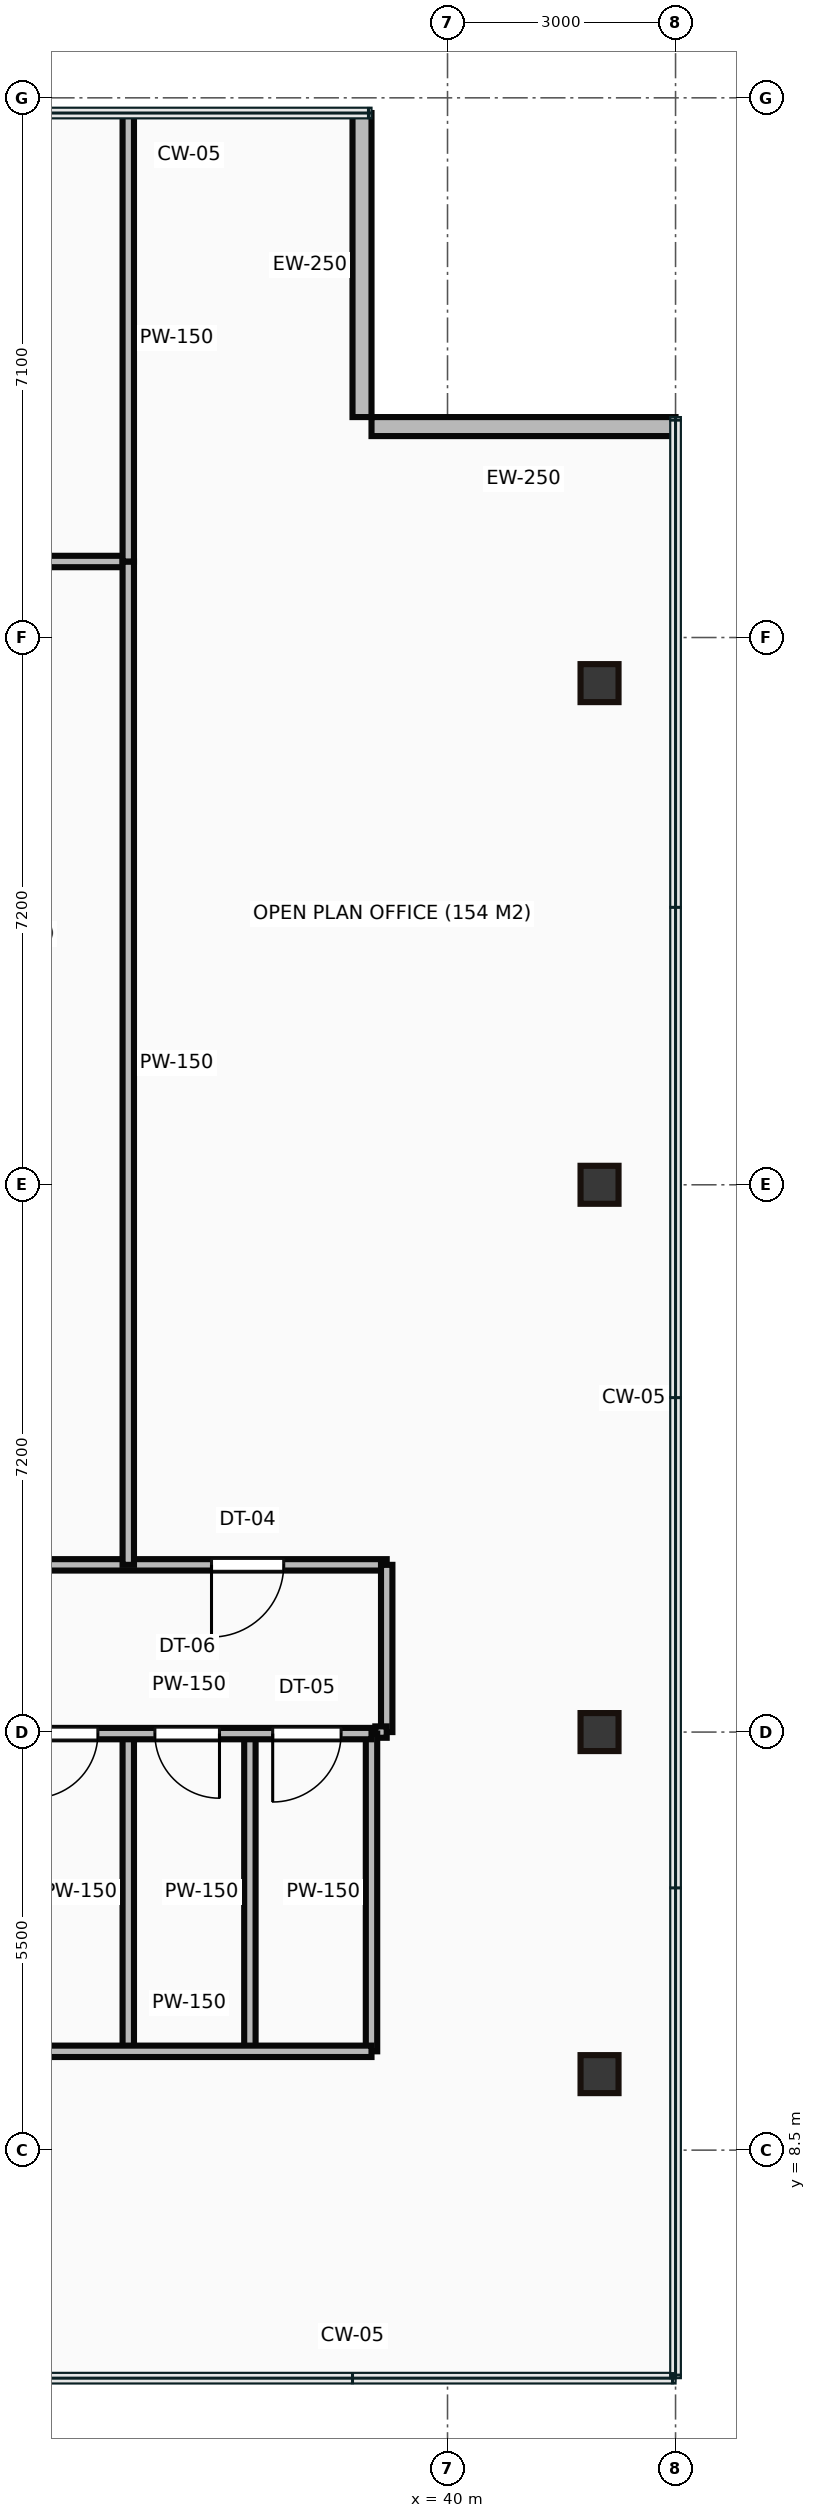
"""IFC4 building model, lengths in metres.
Left out: names, types, materials, properties, quantities, classifications, styles, units other than length and angle.
Written with IfcOpenShell. Run it as: python <this file> out.ifc"""

import sys

from ifc_helpers import new_model, si_unit, direction, frame, frame_2d, origin, origin_2d, place, context, subcontext, project, spatial, rectangle, hollow_rectangle, extrude, source, transform, mapped, element, fill, save


model = new_model("IFC4")
c1 = context("Model", 3, precision=1e-05, world=origin(), true_north=direction((0.0, 1.0)))
c2 = subcontext(c1, "Body", "Model", "MODEL_VIEW")
j1 = project(units=[si_unit("LENGTHUNIT", "METRE"), si_unit("PLANEANGLEUNIT", "RADIAN")], contexts=[c1])
p1 = place(None, origin())
s1 = spatial("IfcSite", under=j1, at=p1, CompositionType="ELEMENT")
p2 = place(p1, origin())
s2 = spatial("IfcBuilding", under=s1, at=p2, CompositionType="ELEMENT")
p3 = place(p2, frame((0.0, 0.0, 225.1)))
s3 = spatial("IfcBuildingStorey", under=s2, at=p3, CompositionType="ELEMENT", Elevation=225.1)
m1 = source(origin(), c2, "Body", "SweptSolid", [
    extrude(hollow_rectangle(XDim=0.5, YDim=0.5, WallThickness=0.022, at=origin_2d()), origin(), (0.0, 0.0, 1.0), 3.65),
])
for number, where, z_axis, x_axis in (
    (1, (42.0, 9.5, 0.0), (0.0, 0.0, 1.0), (1.0, 0.0, 0.0)),
    (2, (42.0, 14.0, 0.0), (0.0, 0.0, 1.0), (1.0, 0.0, 0.0)),
    (3, (42.0, 21.2, 0.0), (0.0, 0.0, 1.0), (1.0, 0.0, 0.0)),
    (4, (42.0, 27.8, 0.0), (0.0, 0.0, 1.0), (1.0, 0.0, 0.0)),
):
    element("IfcColumn", number, at=place(p3, frame(where, z_axis=z_axis, x_axis=x_axis)), inside=s3, PredefinedType="COLUMN", context=c2, shape_type="MappedRepresentation", body=[
        mapped(m1, transform((0.0, 0.0, 0.0))),
    ])
m2 = source(origin(), c2, "Body", "SweptSolid", [
    extrude(rectangle(XDim=4.0, YDim=0.25, at=frame_2d((2.0, 0.0))), origin(), (0.0, 0.0, 1.0), 3.4),
])
for number, where, z_axis, x_axis in (
    (5, (43.0, 31.175, 0.0), (0.0, 0.0, 1.0), (-1.0, 0.0, 0.0)),
    (6, (38.875, 31.3, 0.0), (0.0, 0.0, 1.0), (0.0, 1.0, 0.0)),
):
    element("IfcWall", number, at=place(p3, frame(where, z_axis=z_axis, x_axis=x_axis)), inside=s3, PredefinedType="STANDARD", context=c2, shape_type="MappedRepresentation", body=[
        mapped(m2, transform((0.0, 0.0, 0.0))),
    ])
m3 = source(origin(), c2, "Body", "SweptSolid", [
    extrude(rectangle(XDim=4.8, YDim=0.15, at=frame_2d((2.4, 0.0))), origin(), (0.0, 0.0, 1.0), 2.787),
])
p4 = place(p3, frame((34.2, 13.98, 0.0), z_axis=(0.0, 0.0, 1.0), x_axis=(1.0, 0.0, 0.0)))
e7 = element("IfcWall", 7, at=p4, inside=s3, PredefinedType="PARTITIONING", context=c2, shape_type="MappedRepresentation", body=[
    mapped(m3, transform((0.0, 0.0, 0.0))),
])
p5 = place(p4, frame((0.35, 0.0, 0.0)))
e8 = element("IfcOpeningElement", 8, at=p5, cuts=e7, PredefinedType="OPENING", context=c2, shape_type="SweptSolid", body=[
    extrude(rectangle(XDim=0.85, YDim=2.1, at=frame_2d((0.425, 1.05))), frame((0.0, 0.085, 0.0), z_axis=(0.0, -1.0, 0.0), x_axis=(1.0, 0.0, 0.0)), (0.0, 0.0, 1.0), 0.17),
])
p6 = place(p4, frame((1.95, 0.0, 0.0)))
e9 = element("IfcOpeningElement", 9, at=p6, cuts=e7, PredefinedType="OPENING", context=c2, shape_type="SweptSolid", body=[
    extrude(rectangle(XDim=0.85, YDim=2.1, at=frame_2d((0.425, 1.05))), frame((0.0, 0.085, 0.0), z_axis=(0.0, -1.0, 0.0), x_axis=(1.0, 0.0, 0.0)), (0.0, 0.0, 1.0), 0.17),
])
p7 = place(p4, frame((3.5, 0.0, 0.0)))
e10 = element("IfcOpeningElement", 10, at=p7, cuts=e7, PredefinedType="OPENING", context=c2, shape_type="SweptSolid", body=[
    extrude(rectangle(XDim=0.9, YDim=2.1, at=frame_2d((0.45, 1.05))), frame((0.0, 0.085, 0.0), z_axis=(0.0, -1.0, 0.0), x_axis=(1.0, 0.0, 0.0)), (0.0, 0.0, 1.0), 0.17),
])
m4 = source(origin(), c2, "Body", "SweptSolid", [
    extrude(rectangle(XDim=4.8, YDim=0.15, at=frame_2d((2.4, 0.0))), origin(), (0.0, 0.0, 1.0), 3.4),
])
p8 = place(p3, frame((34.2, 9.8, 0.0), z_axis=(0.0, 0.0, 1.0), x_axis=(1.0, 0.0, 0.0)))
e11 = element("IfcWall", 11, at=p8, inside=s3, PredefinedType="PARTITIONING", context=c2, shape_type="MappedRepresentation", body=[
    mapped(m4, transform((0.0, 0.0, 0.0))),
])
m5 = source(origin(), c2, "Body", "SweptSolid", [
    extrude(rectangle(XDim=4.18, YDim=0.15, at=frame_2d((2.09, 0.0))), origin(), (0.0, 0.0, 1.0), 3.4),
])
for number, where, z_axis, x_axis in (
    (12, (39.0, 9.8, 0.0), (0.0, 0.0, 1.0), (0.0, 1.0, 0.0)),
    (13, (35.8, 9.8, 0.0), (0.0, 0.0, 1.0), (0.0, 1.0, 0.0)),
    (14, (37.4, 9.8, 0.0), (0.0, 0.0, 1.0), (0.0, 1.0, 0.0)),
):
    element("IfcWall", number, at=place(p3, frame(where, z_axis=z_axis, x_axis=x_axis)), inside=s3, PredefinedType="PARTITIONING", context=c2, shape_type="MappedRepresentation", body=[
        mapped(m5, transform((0.0, 0.0, 0.0))),
    ])
m6 = source(origin(), c2, "Body", "SweptSolid", [
    extrude(rectangle(XDim=10.2, YDim=0.15, at=frame_2d((5.1, 0.0))), origin(), (0.0, 0.0, 1.0), 3.4),
])
p9 = place(p3, frame((29.0, 16.2, 0.0), z_axis=(0.0, 0.0, 1.0), x_axis=(1.0, 0.0, 0.0)))
e15 = element("IfcWall", 15, at=p9, inside=s3, PredefinedType="PARTITIONING", context=c2, shape_type="MappedRepresentation", body=[
    mapped(m6, transform((0.0, 0.0, 0.0))),
])
p10 = place(p9, frame((7.895, 0.0, 0.0)))
e16 = element("IfcOpeningElement", 16, at=p10, cuts=e15, PredefinedType="OPENING", context=c2, shape_type="SweptSolid", body=[
    extrude(rectangle(XDim=0.95, YDim=2.15, at=frame_2d((0.475, 1.075))), frame((0.0, 0.085, 0.0), z_axis=(0.0, -1.0, 0.0), x_axis=(1.0, 0.0, 0.0)), (0.0, 0.0, 1.0), 0.17),
])
m7 = source(origin(), c2, "Body", "SweptSolid", [
    extrude(rectangle(XDim=2.2, YDim=0.15, at=frame_2d((1.1, 0.0))), origin(), (0.0, 0.0, 1.0), 3.4),
])
p11 = place(p3, frame((39.2, 16.2, 0.0), z_axis=(0.0, 0.0, 1.0), x_axis=(0.0, -1.0, 0.0)))
e17 = element("IfcWall", 17, at=p11, inside=s3, PredefinedType="PARTITIONING", context=c2, shape_type="MappedRepresentation", body=[
    mapped(m7, transform((0.0, 0.0, 0.0))),
])
m8 = source(origin(), c2, "Body", "SweptSolid", [
    extrude(rectangle(XDim=0.15, YDim=0.15, at=frame_2d((0.075, 0.0))), origin(), (0.0, 0.0, 1.0), 3.4),
])
p12 = place(p3, frame((39.2, 14.0, 0.0), z_axis=(0.0, 0.0, 1.0), x_axis=(-1.0, 0.0, 0.0)))
e18 = element("IfcWall", 18, at=p12, inside=s3, PredefinedType="PARTITIONING", context=c2, shape_type="MappedRepresentation", body=[
    mapped(m8, transform((0.0, 0.0, 0.0))),
])
m9 = source(origin(), c2, "Body", "SweptSolid", [
    extrude(rectangle(XDim=6.8, YDim=0.15, at=frame_2d((3.4, 0.0))), origin(), (0.0, 0.0, 1.0), 3.4),
])
p13 = place(p3, frame((35.8, 29.4, 0.0), z_axis=(0.0, 0.0, 1.0), x_axis=(-1.0, 0.0, 0.0)))
e19 = element("IfcWall", 19, at=p13, inside=s3, PredefinedType="PARTITIONING", context=c2, shape_type="MappedRepresentation", body=[
    mapped(m9, transform((0.0, 0.0, 0.0))),
])
m10 = source(origin(), c2, "Body", "SweptSolid", [
    extrude(rectangle(XDim=13.2, YDim=0.15, at=frame_2d((6.6, 0.0))), origin(), (0.0, 0.0, 1.0), 3.4),
])
p14 = place(p3, frame((35.8, 29.4, 0.0), z_axis=(0.0, 0.0, 1.0), x_axis=(0.0, -1.0, 0.0)))
e20 = element("IfcWall", 20, at=p14, inside=s3, PredefinedType="PARTITIONING", context=c2, shape_type="MappedRepresentation", body=[
    mapped(m10, transform((0.0, 0.0, 0.0))),
])
m11 = source(origin(), c2, "Body", "SweptSolid", [
    extrude(rectangle(XDim=5.88, YDim=0.15, at=frame_2d((2.94, 0.0))), origin(), (0.0, 0.0, 1.0), 3.4),
])
p15 = place(p3, frame((35.8, 35.28, 0.0), z_axis=(0.0, 0.0, 1.0), x_axis=(0.0, -1.0, 0.0)))
e21 = element("IfcWall", 21, at=p15, inside=s3, PredefinedType="PARTITIONING", context=c2, shape_type="MappedRepresentation", body=[
    mapped(m11, transform((0.0, 0.0, 0.0))),
])
m12 = source(origin(), c2, "Body", "SweptSolid", [
    extrude(rectangle(XDim=0.85, YDim=2.1, at=frame_2d((0.425, 1.05))), frame((0.0, 0.025, 0.0), z_axis=(0.0, -1.0, 0.0), x_axis=(1.0, 0.0, 0.0)), (0.0, 0.0, 1.0), 0.05),
])
p16 = place(p5, frame((0.85, 0.0, 0.0), z_axis=(0.0, 0.0, 1.0), x_axis=(-1.0, 0.0, 0.0)))
e22 = element("IfcDoor", 22, at=p16, inside=s3, OperationType="SINGLE_SWING_LEFT", PredefinedType="DOOR", context=c2, shape_type="MappedRepresentation", body=[
    mapped(m12, transform((0.0, 0.0, 0.0))),
])
fill(e8, e22)
p17 = place(p6, frame((0.85, 0.0, 0.0), z_axis=(0.0, 0.0, 1.0), x_axis=(-1.0, 0.0, 0.0)))
e23 = element("IfcDoor", 23, at=p17, inside=s3, OperationType="SINGLE_SWING_RIGHT", PredefinedType="DOOR", context=c2, shape_type="MappedRepresentation", body=[
    mapped(m12, transform((0.0, 0.0, 0.0))),
])
fill(e9, e23)
m13 = source(origin(), c2, "Body", "SweptSolid", [
    extrude(rectangle(XDim=0.9, YDim=2.1, at=frame_2d((0.45, 1.05))), frame((0.0, 0.025, 0.0), z_axis=(0.0, -1.0, 0.0), x_axis=(1.0, 0.0, 0.0)), (0.0, 0.0, 1.0), 0.05),
])
p18 = place(p7, frame((0.9, 0.0, 0.0), z_axis=(0.0, 0.0, 1.0), x_axis=(-1.0, 0.0, 0.0)))
e24 = element("IfcDoor", 24, at=p18, inside=s3, OperationType="SINGLE_SWING_LEFT", PredefinedType="DOOR", context=c2, shape_type="MappedRepresentation", body=[
    mapped(m13, transform((0.0, 0.0, 0.0))),
])
fill(e10, e24)
m14 = source(origin(), c2, "Body", "SweptSolid", [
    extrude(rectangle(XDim=0.95, YDim=2.15, at=frame_2d((0.475, 1.075))), frame((0.0, 0.025, 0.0), z_axis=(0.0, -1.0, 0.0), x_axis=(1.0, 0.0, 0.0)), (0.0, 0.0, 1.0), 0.05),
])
p19 = place(p10, origin())
e25 = element("IfcDoor", 25, at=p19, inside=s3, OperationType="SINGLE_SWING_LEFT", PredefinedType="DOOR", context=c2, shape_type="MappedRepresentation", body=[
    mapped(m14, transform((0.0, 0.0, 0.0))),
])
fill(e16, e25)
save(model, sys.argv[1])
